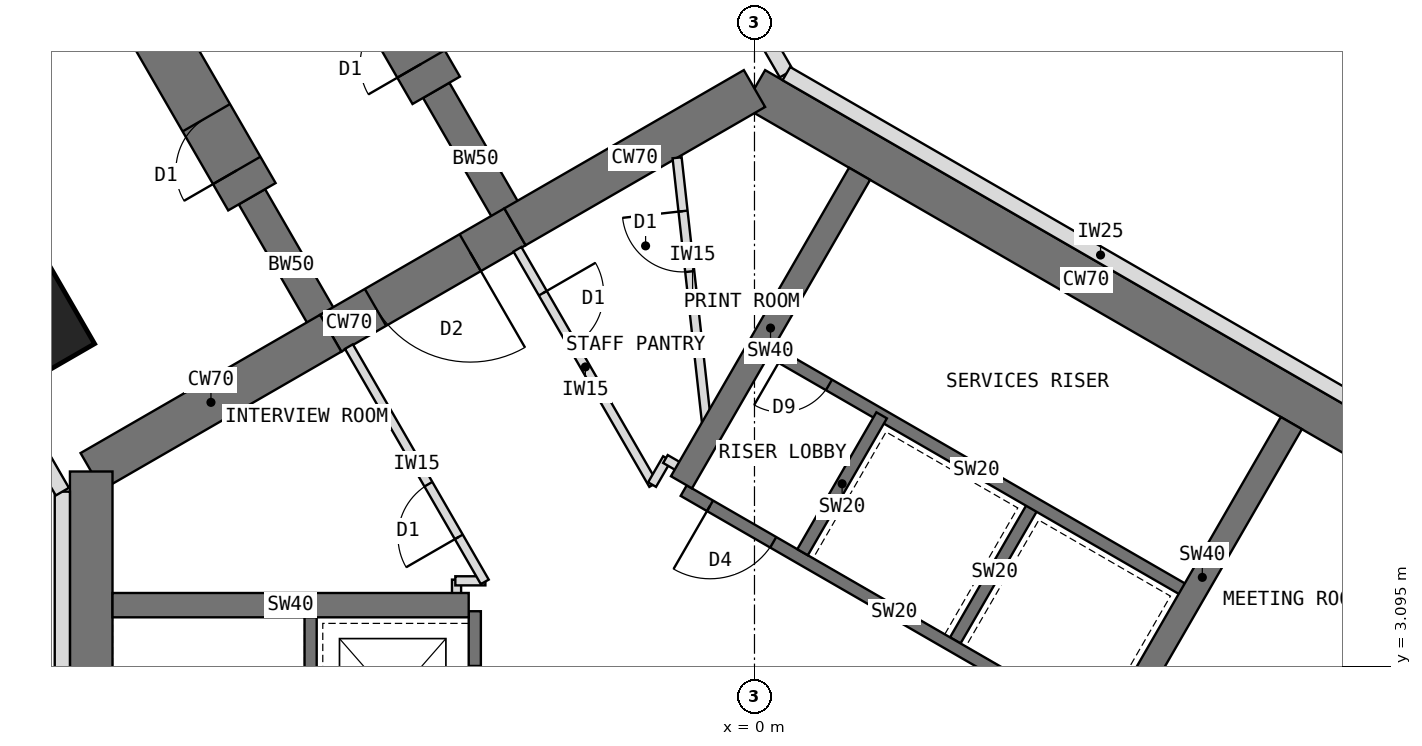
"""IFC4 building model, lengths in metres.
Left out: names, types, materials, properties, quantities, classifications, styles, units other than length and angle.
Written with IfcOpenShell. Run it as: python <this file> out.ifc"""

import sys

from ifc_helpers import new_model, si_unit, direction, frame, frame_2d, origin, origin_2d, place, context, subcontext, project, spatial, rectangle, extrude, element, fill, save


model = new_model("IFC4")
c1 = context("Model", 3, precision=1e-05, world=origin(), true_north=direction((0.0, 1.0)))
c2 = subcontext(c1, "Body", "Model", "MODEL_VIEW")
j1 = project(units=[si_unit("LENGTHUNIT", "METRE"), si_unit("PLANEANGLEUNIT", "RADIAN")], contexts=[c1])
p1 = place(None, origin())
s1 = spatial("IfcSite", under=j1, at=p1, CompositionType="ELEMENT")
p2 = place(p1, origin())
s2 = spatial("IfcBuilding", under=s1, at=p2, CompositionType="ELEMENT")
p3 = place(p2, frame((0.0, 0.0, 15.5)))
s3 = spatial("IfcBuildingStorey", under=s2, at=p3, CompositionType="ELEMENT", Elevation=15.5)
p4 = place(p3, frame((10.908, 6.298, 0.0), z_axis=(0.0, 0.0, 1.0), x_axis=(-0.866021940709, 0.500005998175, 0.0)))
e1 = element("IfcWall", 1, at=p4, inside=s3, PredefinedType="SHEAR", context=c2, shape_type="SweptSolid", body=[
    extrude(rectangle(XDim=12.596, YDim=0.7, at=frame_2d((6.298, 0.0))), origin(), (0.0, 0.0, 1.0), 5.0),
])
p5 = place(p3, frame((0.0, 12.596, 0.0), z_axis=(0.0, 0.0, 1.0), x_axis=(-0.866011268655, -0.500024481964, 0.0)))
e2 = element("IfcWall", 2, at=p5, inside=s3, PredefinedType="SHEAR", context=c2, shape_type="SweptSolid", body=[
    extrude(rectangle(XDim=4.548, YDim=0.7, at=frame_2d((2.274, 0.0))), origin(), (0.0, 0.0, 1.0), 5.0),
])
p6 = place(p3, frame((-3.939, 10.322, 0.0), z_axis=(0.0, 0.0, 1.0), x_axis=(-0.866019471182, -0.500010275428, 0.0)))
e3 = element("IfcWall", 3, at=p6, inside=s3, PredefinedType="SHEAR", context=c2, shape_type="SweptSolid", body=[
    extrude(rectangle(XDim=3.5, YDim=0.7, at=frame_2d((1.75, 0.0))), origin(), (0.0, 0.0, 1.0), 5.0),
])
p7 = place(p6, frame((0.85, 0.0, 0.0)))
e4 = element("IfcOpeningElement", 4, at=p7, cuts=e3, PredefinedType="OPENING", context=c2, shape_type="SweptSolid", body=[
    extrude(rectangle(XDim=1.8, YDim=2.1, at=frame_2d((0.9, 1.05))), frame((0.0, 0.36, 0.0), z_axis=(0.0, -1.0, 0.0), x_axis=(1.0, 0.0, 0.0)), (0.0, 0.0, 1.0), 0.72),
])
p8 = place(p3, frame((-6.97, 8.572, 0.0), z_axis=(0.0, 0.0, 1.0), x_axis=(-0.866034513004, -0.499984222037, 0.0)))
e5 = element("IfcWall", 5, at=p8, inside=s3, PredefinedType="SHEAR", context=c2, shape_type="SweptSolid", body=[
    extrude(rectangle(XDim=4.548, YDim=0.7, at=frame_2d((2.274, 0.0))), origin(), (0.0, 0.0, 1.0), 5.0),
])
p9 = place(p3, frame((-10.908, 6.298, 0.0), z_axis=(0.0, 0.0, 1.0), x_axis=(0.0, -1.0, 0.0)))
e6 = element("IfcWall", 6, at=p9, inside=s3, PredefinedType="SHEAR", context=c2, shape_type="SweptSolid", body=[
    extrude(rectangle(XDim=12.596, YDim=0.7, at=frame_2d((6.298, 0.0))), origin(), (0.0, 0.0, 1.0), 5.0),
])
p10 = place(p3, frame((-6.97, 8.572, 0.0), z_axis=(0.0, 0.0, 1.0), x_axis=(-0.499988811324, 0.866031863473, 0.0)))
e7 = element("IfcWall", 7, at=p10, inside=s3, PredefinedType="SHEAR", context=c2, shape_type="SweptSolid", body=[
    extrude(rectangle(XDim=2.592, YDim=0.5, at=frame_2d((1.296, 0.0))), origin(), (0.0, 0.0, 1.0), 5.0),
])
p11 = place(p3, frame((-8.266, 10.816, 0.0), z_axis=(0.0, 0.0, 1.0), x_axis=(-0.499996231654, 0.866027579429, 0.0)))
e8 = element("IfcWall", 8, at=p11, inside=s3, PredefinedType="SHEAR", context=c2, shape_type="SweptSolid", body=[
    extrude(rectangle(XDim=13.2, YDim=0.9, at=frame_2d((6.6, 0.0))), origin(), (0.0, 0.0, 1.0), 5.0),
])
p12 = place(p11, frame((0.5, 0.0, 0.0)))
e9 = element("IfcOpeningElement", 9, at=p12, cuts=e8, PredefinedType="OPENING", context=c2, shape_type="SweptSolid", body=[
    extrude(rectangle(XDim=1.0, YDim=2.1, at=frame_2d((0.5, 1.05))), frame((0.0, 0.46, 0.0), z_axis=(0.0, -1.0, 0.0), x_axis=(1.0, 0.0, 0.0)), (0.0, 0.0, 1.0), 0.92),
])
p13 = place(p3, frame((-3.939, 10.322, 0.0), z_axis=(0.0, 0.0, 1.0), x_axis=(-0.499918158782, 0.866072649678, 0.0)))
e10 = element("IfcWall", 10, at=p13, inside=s3, PredefinedType="SHEAR", context=c2, shape_type="SweptSolid", body=[
    extrude(rectangle(XDim=2.592, YDim=0.5, at=frame_2d((1.296, 0.0))), origin(), (0.0, 0.0, 1.0), 5.0),
])
p14 = place(p3, frame((-5.234, 12.566, 0.0), z_axis=(0.0, 0.0, 1.0), x_axis=(-0.500010103361, 0.866019570528, 0.0)))
e11 = element("IfcWall", 11, at=p14, inside=s3, PredefinedType="SHEAR", context=c2, shape_type="SweptSolid", body=[
    extrude(rectangle(XDim=13.2, YDim=0.9, at=frame_2d((6.6, 0.0))), origin(), (0.0, 0.0, 1.0), 5.0),
])
p15 = place(p14, frame((0.5, 0.0, 0.0)))
e12 = element("IfcOpeningElement", 12, at=p15, cuts=e11, PredefinedType="OPENING", context=c2, shape_type="SweptSolid", body=[
    extrude(rectangle(XDim=1.0, YDim=2.1, at=frame_2d((0.5, 1.05))), frame((0.0, 0.46, 0.0), z_axis=(0.0, -1.0, 0.0), x_axis=(1.0, 0.0, 0.0)), (0.0, 0.0, 1.0), 0.92),
])
p16 = place(p3, frame((-11.946, 8.691, 0.0), z_axis=(0.0, 0.0, 1.0), x_axis=(0.866025403784, 0.5, 0.0)))
e13 = element("IfcColumn", 13, at=p16, inside=s3, PredefinedType="COLUMN", context=c2, shape_type="SweptSolid", body=[
    extrude(rectangle(XDim=1.6, YDim=1.6, at=origin_2d()), origin(), (0.0, 0.0, 1.0), 5.0),
])
p17 = place(p3, frame((5.764, 1.984, 0.0), z_axis=(0.0, 0.0, 1.0), x_axis=(-0.866026010844, 0.49999894854, 0.0)))
e14 = element("IfcWall", 14, at=p17, inside=s3, PredefinedType="SHEAR", context=c2, shape_type="SweptSolid", body=[
    extrude(rectangle(XDim=8.0, YDim=0.2, at=frame_2d((4.0, 0.0))), origin(), (0.0, 0.0, 1.0), 5.0),
])
p18 = place(p17, frame((6.3, 0.0, 0.0)))
e15 = element("IfcOpeningElement", 15, at=p18, cuts=e14, PredefinedType="OPENING", context=c2, shape_type="SweptSolid", body=[
    extrude(rectangle(XDim=1.2, YDim=2.1, at=frame_2d((0.6, 1.05))), frame((0.0, 0.11, 0.0), z_axis=(0.0, -1.0, 0.0), x_axis=(1.0, 0.0, 0.0)), (0.0, 0.0, 1.0), 0.22),
])
for number, where, z_axis, x_axis in (
    (16, (3.303, 3.52, 0.0), (0.0, 0.0, 1.0), (0.5, 0.866, 0.0)),
    (17, (0.791, 4.97, 0.0), (0.0, 0.0, 1.0), (0.5, 0.866, 0.0)),
):
    element("IfcWall", number, at=place(p3, frame(where, z_axis=z_axis, x_axis=x_axis)), inside=s3, PredefinedType="SHEAR", context=c2, shape_type="SweptSolid", body=[
        extrude(rectangle(XDim=2.6, YDim=0.2, at=frame_2d((1.3, 0.0))), origin(), (0.0, 0.0, 1.0), 5.0),
    ])
p19 = place(p3, frame((7.114, 4.322, 0.0), z_axis=(0.0, 0.0, 1.0), x_axis=(-0.866026010844, 0.49999894854, 0.0)))
e18 = element("IfcWall", 18, at=p19, inside=s3, PredefinedType="SHEAR", context=c2, shape_type="SweptSolid", body=[
    extrude(rectangle(XDim=8.0, YDim=0.2, at=frame_2d((4.0, 0.0))), origin(), (0.0, 0.0, 1.0), 5.0),
])
p20 = place(p19, frame((6.8, 0.0, 0.0)))
e19 = element("IfcOpeningElement", 19, at=p20, cuts=e18, PredefinedType="OPENING", context=c2, shape_type="SweptSolid", body=[
    extrude(rectangle(XDim=0.9, YDim=2.1, at=frame_2d((0.45, 1.05))), frame((0.0, 0.11, 0.0), z_axis=(0.0, -1.0, 0.0), x_axis=(1.0, 0.0, 0.0)), (0.0, 0.0, 1.0), 0.22),
])
for number, where, z_axis, x_axis in (
    (20, (-1.201, 6.12, 0.0), (0.0, 0.0, 1.0), (0.5, 0.866, 0.0)),
    (21, (5.901, 2.02, 0.0), (0.0, 0.0, 1.0), (0.5, 0.866, 0.0)),
):
    element("IfcWall", number, at=place(p3, frame(where, z_axis=z_axis, x_axis=x_axis)), inside=s3, PredefinedType="SHEAR", context=c2, shape_type="SweptSolid", body=[
        extrude(rectangle(XDim=5.858, YDim=0.4, at=frame_2d((2.929, 0.0))), origin(), (0.0, 0.0, 1.0), 5.0),
    ])
p21 = place(p3, frame((-4.6, 4.0, 0.0), z_axis=(0.0, 0.0, 1.0), x_axis=(0.0, -1.0, 0.0)))
e22 = element("IfcWall", 22, at=p21, inside=s3, PredefinedType="SHEAR", context=c2, shape_type="SweptSolid", body=[
    extrude(rectangle(XDim=8.0, YDim=0.2, at=frame_2d((4.0, 0.0))), origin(), (0.0, 0.0, 1.0), 5.0),
])
p22 = place(p21, frame((6.3, 0.0, 0.0)))
e23 = element("IfcOpeningElement", 23, at=p22, cuts=e22, PredefinedType="OPENING", context=c2, shape_type="SweptSolid", body=[
    extrude(rectangle(XDim=1.2, YDim=2.1, at=frame_2d((0.6, 1.05))), frame((0.0, 0.11, 0.0), z_axis=(0.0, -1.0, 0.0), x_axis=(1.0, 0.0, 0.0)), (0.0, 0.0, 1.0), 0.22),
])
p23 = place(p21, frame((0.9, 0.0, 0.0)))
e24 = element("IfcOpeningElement", 24, at=p23, cuts=e22, PredefinedType="OPENING", context=c2, shape_type="SweptSolid", body=[
    extrude(rectangle(XDim=1.1, YDim=2.2, at=frame_2d((0.55, 1.1))), frame((0.0, 0.11, 0.0), z_axis=(0.0, -1.0, 0.0), x_axis=(1.0, 0.0, 0.0)), (0.0, 0.0, 1.0), 0.22),
])
p24 = place(p3, frame((-7.3, 4.0, 0.0), z_axis=(0.0, 0.0, 1.0), x_axis=(0.0, -1.0, 0.0)))
e25 = element("IfcWall", 25, at=p24, inside=s3, PredefinedType="SHEAR", context=c2, shape_type="SweptSolid", body=[
    extrude(rectangle(XDim=8.0, YDim=0.2, at=frame_2d((4.0, 0.0))), origin(), (0.0, 0.0, 1.0), 5.0),
])
p25 = place(p24, frame((6.7, 0.0, 0.0)))
e26 = element("IfcOpeningElement", 26, at=p25, cuts=e25, PredefinedType="OPENING", context=c2, shape_type="SweptSolid", body=[
    extrude(rectangle(XDim=1.1, YDim=2.1, at=frame_2d((0.55, 1.05))), frame((0.0, 0.11, 0.0), z_axis=(0.0, -1.0, 0.0), x_axis=(1.0, 0.0, 0.0)), (0.0, 0.0, 1.0), 0.22),
])
p26 = place(p3, frame((-4.7, 4.1, 0.0), z_axis=(0.0, 0.0, 1.0), x_axis=(-1.0, 0.0, 0.0)))
e27 = element("IfcWall", 27, at=p26, inside=s3, PredefinedType="SHEAR", context=c2, shape_type="SweptSolid", body=[
    extrude(rectangle(XDim=5.858, YDim=0.4, at=frame_2d((2.929, 0.0))), origin(), (0.0, 0.0, 1.0), 5.0),
])
p27 = place(p3, frame((-4.9, 4.09, 0.0), z_axis=(0.0, 0.0, 1.0), x_axis=(0.0, 1.0, 0.0)))
e28 = element("IfcWall", 28, at=p27, inside=s3, PredefinedType="PARTITIONING", context=c2, shape_type="SweptSolid", body=[
    extrude(rectangle(XDim=0.43, YDim=0.15, at=frame_2d((0.215, 0.0))), origin(), (0.0, 0.0, 1.0), 4.8),
])
p28 = place(p3, frame((-4.92, 4.5, 0.0), z_axis=(0.0, 0.0, 1.0), x_axis=(1.0, 0.0, 0.0)))
e29 = element("IfcWall", 29, at=p28, inside=s3, PredefinedType="PARTITIONING", context=c2, shape_type="SweptSolid", body=[
    extrude(rectangle(XDim=0.494, YDim=0.15, at=frame_2d((0.247, 0.0))), origin(), (0.0, 0.0, 1.0), 4.8),
])
p29 = place(p3, frame((-4.436, 4.483, 0.0), z_axis=(0.0, 0.0, 1.0), x_axis=(-0.500017246033, 0.866015446554, 0.0)))
e30 = element("IfcWall", 30, at=p29, inside=s3, PredefinedType="PARTITIONING", context=c2, shape_type="SweptSolid", body=[
    extrude(rectangle(XDim=4.469, YDim=0.15, at=frame_2d((2.234, 0.0))), origin(), (0.0, 0.0, 1.0), 4.8),
])
p30 = place(p29, frame((0.855, 0.0, 0.0)))
e31 = element("IfcOpeningElement", 31, at=p30, cuts=e30, PredefinedType="OPENING", context=c2, shape_type="SweptSolid", body=[
    extrude(rectangle(XDim=1.0, YDim=2.1, at=frame_2d((0.5, 1.05))), frame((0.0, 0.085, 0.0), z_axis=(0.0, -1.0, 0.0), x_axis=(1.0, 0.0, 0.0)), (0.0, 0.0, 1.0), 0.17),
])
p31 = place(p3, frame((-3.898, 9.952, 0.0), z_axis=(0.0, 0.0, 1.0), x_axis=(0.499999927604, -0.866025445582, 0.0)))
e32 = element("IfcWall", 32, at=p31, inside=s3, PredefinedType="PARTITIONING", context=c2, shape_type="SweptSolid", body=[
    extrude(rectangle(XDim=4.468, YDim=0.15, at=frame_2d((2.234, 0.0))), origin(), (0.0, 0.0, 1.0), 4.8),
])
p32 = place(p31, frame((0.834, 0.0, 0.0)))
e33 = element("IfcOpeningElement", 33, at=p32, cuts=e32, PredefinedType="OPENING", context=c2, shape_type="SweptSolid", body=[
    extrude(rectangle(XDim=1.0, YDim=2.1, at=frame_2d((0.5, 1.05))), frame((0.0, 0.085, 0.0), z_axis=(0.0, -1.0, 0.0), x_axis=(1.0, 0.0, 0.0)), (0.0, 0.0, 1.0), 0.17),
])
p33 = place(p3, frame((-1.684, 6.083, 0.0), z_axis=(0.0, 0.0, 1.0), x_axis=(0.50033519877, 0.865831790172, 0.0)))
e34 = element("IfcWall", 34, at=p33, inside=s3, PredefinedType="PARTITIONING", context=c2, shape_type="SweptSolid", body=[
    extrude(rectangle(XDim=0.494, YDim=0.15, at=frame_2d((0.247, 0.0))), origin(), (0.0, 0.0, 1.0), 4.8),
])
p34 = place(p3, frame((-1.464, 6.503, 0.0), z_axis=(0.0, 0.0, 1.0), x_axis=(0.866138304741, -0.499804398801, 0.0)))
e35 = element("IfcWall", 35, at=p34, inside=s3, PredefinedType="PARTITIONING", context=c2, shape_type="SweptSolid", body=[
    extrude(rectangle(XDim=0.43, YDim=0.15, at=frame_2d((0.215, 0.0))), origin(), (0.0, 0.0, 1.0), 4.8),
])
p35 = place(p3, frame((-0.764, 6.877, 0.0), z_axis=(0.0, 0.0, 1.0), x_axis=(-0.110408266965, 0.993886318744, 0.0)))
e36 = element("IfcWall", 36, at=p35, inside=s3, PredefinedType="PARTITIONING", context=c2, shape_type="SweptSolid", body=[
    extrude(rectangle(XDim=4.608, YDim=0.15, at=frame_2d((2.304, 0.0))), origin(), (0.0, 0.0, 1.0), 4.8),
])
p36 = place(p35, frame((2.726, 0.0, 0.0)))
e37 = element("IfcOpeningElement", 37, at=p36, cuts=e36, PredefinedType="OPENING", context=c2, shape_type="SweptSolid", body=[
    extrude(rectangle(XDim=1.0, YDim=2.1, at=frame_2d((0.5, 1.05))), frame((0.0, 0.085, 0.0), z_axis=(0.0, -1.0, 0.0), x_axis=(1.0, 0.0, 0.0)), (0.0, 0.0, 1.0), 0.17),
])
p37 = place(p3, frame((-11.383, -5.967, 0.0), z_axis=(0.0, 0.0, 1.0), x_axis=(0.0, 1.0, 0.0)))
e38 = element("IfcWall", 38, at=p37, inside=s3, PredefinedType="STANDARD", context=c2, shape_type="SweptSolid", body=[
    extrude(rectangle(XDim=11.933, YDim=0.25, at=frame_2d((5.967, 0.0))), origin(), (0.0, 0.0, 1.0), 4.65),
])
for number, where, z_axis, x_axis in (
    (39, (-11.383, 5.967, 0.0), (0.0, 0.0, 1.0), (-0.5, 0.866, 0.0)),
    (40, (-6.484, 24.98, 0.0), (0.0, 0.0, 1.0), (0.5, -0.866, 0.0)),
):
    element("IfcWall", number, at=place(p3, frame(where, z_axis=z_axis, x_axis=x_axis)), inside=s3, PredefinedType="STANDARD", context=c2, shape_type="SweptSolid", body=[
        extrude(rectangle(XDim=14.016, YDim=0.25, at=frame_2d((7.008, 0.0))), origin(), (0.0, 0.0, 1.0), 4.65),
    ])
p38 = place(p3, frame((0.524, 12.842, 0.0), z_axis=(0.0, 0.0, 1.0), x_axis=(0.866027502425, -0.499996365031, 0.0)))
e41 = element("IfcWall", 41, at=p38, inside=s3, PredefinedType="STANDARD", context=c2, shape_type="SweptSolid", body=[
    extrude(rectangle(XDim=11.933, YDim=0.25, at=frame_2d((5.967, 0.0))), origin(), (0.0, 0.0, 1.0), 4.65),
])
p39 = place(p18, origin())
e42 = element("IfcDoor", 42, at=p39, inside=s3, OperationType="SINGLE_SWING_RIGHT", PredefinedType="DOOR", context=c2, shape_type="SweptSolid", body=[
    extrude(rectangle(XDim=1.2, YDim=2.1, at=frame_2d((0.6, 1.05))), frame((0.0, 0.025, 0.0), z_axis=(0.0, -1.0, 0.0), x_axis=(1.0, 0.0, 0.0)), (0.0, 0.0, 1.0), 0.05),
])
fill(e15, e42)
p40 = place(p20, origin())
e43 = element("IfcDoor", 43, at=p40, inside=s3, OperationType="SINGLE_SWING_RIGHT", PredefinedType="DOOR", context=c2, shape_type="SweptSolid", body=[
    extrude(rectangle(XDim=0.9, YDim=2.1, at=frame_2d((0.45, 1.05))), frame((0.0, 0.025, 0.0), z_axis=(0.0, -1.0, 0.0), x_axis=(1.0, 0.0, 0.0)), (0.0, 0.0, 1.0), 0.05),
])
fill(e19, e43)
p41 = place(p7, origin())
e44 = element("IfcDoor", 44, at=p41, inside=s3, OperationType="DOUBLE_DOOR_DOUBLE_SWING", PredefinedType="DOOR", context=c2, shape_type="SweptSolid", body=[
    extrude(rectangle(XDim=1.72, YDim=2.06, at=frame_2d((0.9, 1.03))), frame((0.0, 0.025, 0.0), z_axis=(0.0, -1.0, 0.0), x_axis=(1.0, 0.0, 0.0)), (0.0, 0.0, 1.0), 0.05),
    extrude(rectangle(XDim=0.04, YDim=2.1, at=frame_2d((0.02, 1.05))), frame((0.0, 0.35, 0.0), z_axis=(0.0, -1.0, 0.0), x_axis=(1.0, 0.0, 0.0)), (0.0, 0.0, 1.0), 0.699),
    extrude(rectangle(XDim=0.04, YDim=2.1, at=frame_2d((1.78, 1.05))), frame((0.0, 0.35, 0.0), z_axis=(0.0, -1.0, 0.0), x_axis=(1.0, 0.0, 0.0)), (0.0, 0.0, 1.0), 0.699),
    extrude(rectangle(XDim=1.72, YDim=0.04, at=frame_2d((0.9, 2.08))), frame((0.0, 0.35, 0.0), z_axis=(0.0, -1.0, 0.0), x_axis=(1.0, 0.0, 0.0)), (0.0, 0.0, 1.0), 0.699),
])
fill(e4, e44)
p42 = place(p32, origin())
e45 = element("IfcDoor", 45, at=p42, inside=s3, OperationType="SINGLE_SWING_LEFT", PredefinedType="DOOR", context=c2, shape_type="SweptSolid", body=[
    extrude(rectangle(XDim=1.0, YDim=2.1, at=frame_2d((0.5, 1.05))), frame((0.0, 0.025, 0.0), z_axis=(0.0, -1.0, 0.0), x_axis=(1.0, 0.0, 0.0)), (0.0, 0.0, 1.0), 0.05),
])
fill(e33, e45)
p43 = place(p36, origin())
e46 = element("IfcDoor", 46, at=p43, inside=s3, OperationType="SINGLE_SWING_RIGHT", PredefinedType="DOOR", context=c2, shape_type="SweptSolid", body=[
    extrude(rectangle(XDim=1.0, YDim=2.1, at=frame_2d((0.5, 1.05))), frame((0.0, 0.025, 0.0), z_axis=(0.0, -1.0, 0.0), x_axis=(1.0, 0.0, 0.0)), (0.0, 0.0, 1.0), 0.05),
])
fill(e37, e46)
p44 = place(p30, origin())
e47 = element("IfcDoor", 47, at=p44, inside=s3, OperationType="SINGLE_SWING_LEFT", PredefinedType="DOOR", context=c2, shape_type="SweptSolid", body=[
    extrude(rectangle(XDim=1.0, YDim=2.1, at=frame_2d((0.5, 1.05))), frame((0.0, 0.025, 0.0), z_axis=(0.0, -1.0, 0.0), x_axis=(1.0, 0.0, 0.0)), (0.0, 0.0, 1.0), 0.05),
])
fill(e31, e47)
p45 = place(p12, origin())
e48 = element("IfcDoor", 48, at=p45, inside=s3, OperationType="SINGLE_SWING_LEFT", PredefinedType="DOOR", context=c2, shape_type="SweptSolid", body=[
    extrude(rectangle(XDim=0.92, YDim=2.06, at=frame_2d((0.5, 1.03))), frame((0.0, 0.025, 0.0), z_axis=(0.0, -1.0, 0.0), x_axis=(1.0, 0.0, 0.0)), (0.0, 0.0, 1.0), 0.05),
    extrude(rectangle(XDim=0.04, YDim=2.1, at=frame_2d((0.02, 1.05))), frame((0.0, 0.45, 0.0), z_axis=(0.0, -1.0, 0.0), x_axis=(1.0, 0.0, 0.0)), (0.0, 0.0, 1.0), 0.899),
    extrude(rectangle(XDim=0.04, YDim=2.1, at=frame_2d((0.98, 1.05))), frame((0.0, 0.45, 0.0), z_axis=(0.0, -1.0, 0.0), x_axis=(1.0, 0.0, 0.0)), (0.0, 0.0, 1.0), 0.899),
    extrude(rectangle(XDim=0.92, YDim=0.04, at=frame_2d((0.5, 2.08))), frame((0.0, 0.45, 0.0), z_axis=(0.0, -1.0, 0.0), x_axis=(1.0, 0.0, 0.0)), (0.0, 0.0, 1.0), 0.899),
])
fill(e9, e48)
p46 = place(p15, origin())
e49 = element("IfcDoor", 49, at=p46, inside=s3, OperationType="SINGLE_SWING_LEFT", PredefinedType="DOOR", context=c2, shape_type="SweptSolid", body=[
    extrude(rectangle(XDim=0.92, YDim=2.06, at=frame_2d((0.5, 1.03))), frame((0.0, 0.025, 0.0), z_axis=(0.0, -1.0, 0.0), x_axis=(1.0, 0.0, 0.0)), (0.0, 0.0, 1.0), 0.05),
    extrude(rectangle(XDim=0.04, YDim=2.1, at=frame_2d((0.02, 1.05))), frame((0.0, 0.45, 0.0), z_axis=(0.0, -1.0, 0.0), x_axis=(1.0, 0.0, 0.0)), (0.0, 0.0, 1.0), 0.899),
    extrude(rectangle(XDim=0.04, YDim=2.1, at=frame_2d((0.98, 1.05))), frame((0.0, 0.45, 0.0), z_axis=(0.0, -1.0, 0.0), x_axis=(1.0, 0.0, 0.0)), (0.0, 0.0, 1.0), 0.899),
    extrude(rectangle(XDim=0.92, YDim=0.04, at=frame_2d((0.5, 2.08))), frame((0.0, 0.45, 0.0), z_axis=(0.0, -1.0, 0.0), x_axis=(1.0, 0.0, 0.0)), (0.0, 0.0, 1.0), 0.899),
])
fill(e12, e49)
save(model, sys.argv[1])
